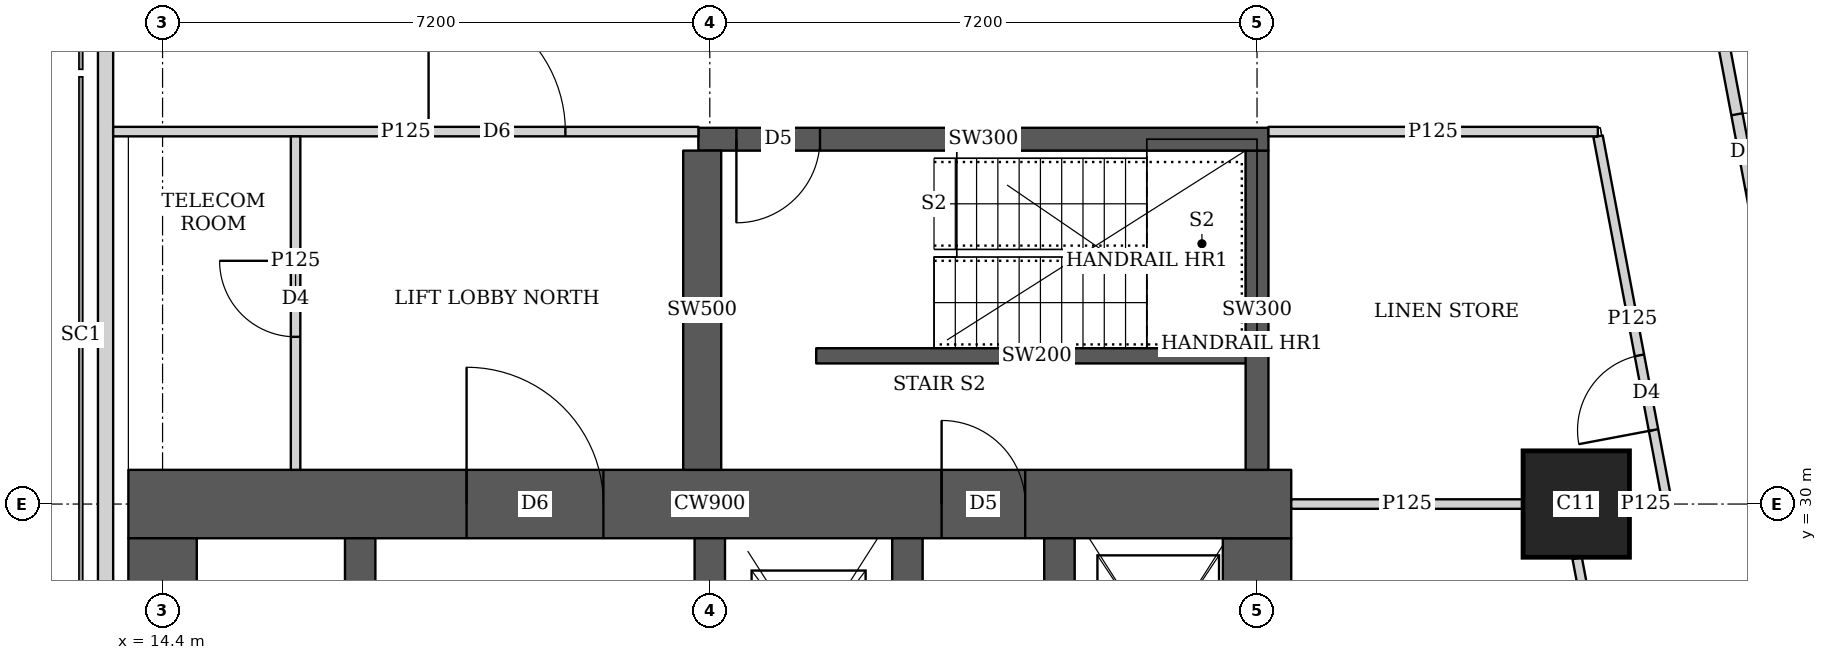
"""IFC4 building model, lengths in metres.
Left out: names, types, materials, properties, quantities, classifications, styles, units other than length and angle.
Written with IfcOpenShell. Run it as: python <this file> out.ifc"""

import sys

from ifc_helpers import new_model, si_unit, direction, frame, frame_2d, origin, origin_2d, place, context, subcontext, project, spatial, rectangle, extrude, element, fill, save


model = new_model("IFC4")
c1 = context("Model", 3, precision=1e-05, world=origin(), true_north=direction((0.0, 1.0)))
c2 = subcontext(c1, "Body", "Model", "MODEL_VIEW")
j1 = project(units=[si_unit("LENGTHUNIT", "METRE"), si_unit("PLANEANGLEUNIT", "RADIAN")], contexts=[c1])
p1 = place(None, origin())
s1 = spatial("IfcSite", under=j1, at=p1, CompositionType="ELEMENT")
p2 = place(p1, origin())
s2 = spatial("IfcBuilding", under=s1, at=p2, CompositionType="ELEMENT")
p3 = place(p2, frame((0.0, 0.0, 259.1)))
s3 = spatial("IfcBuildingStorey", under=s2, at=p3, CompositionType="ELEMENT", Elevation=259.1)
p4 = place(p3, frame((33.0, 30.0, 0.0), z_axis=(0.0, 0.0, 1.0), x_axis=(1.0, 0.0, 0.0)))
e1 = element("IfcColumn", 1, at=p4, inside=s3, PredefinedType="COLUMN", context=c2, shape_type="SweptSolid", body=[
    extrude(rectangle(XDim=1.4, YDim=1.4, at=origin_2d()), origin(), (0.0, 0.0, 1.0), 3.75),
])
p5 = place(p3, frame((13.95, 30.0, 0.0), z_axis=(0.0, 0.0, 1.0), x_axis=(1.0, 0.0, 0.0)))
e2 = element("IfcWall", 2, at=p5, inside=s3, PredefinedType="SHEAR", context=c2, shape_type="SweptSolid", body=[
    extrude(rectangle(XDim=15.3, YDim=0.9, at=frame_2d((7.65, 0.0))), origin(), (0.0, 0.0, 1.0), 3.75),
])
p6 = place(p5, frame((4.45, 0.0, 0.0)))
e3 = element("IfcOpeningElement", 3, at=p6, cuts=e2, PredefinedType="OPENING", context=c2, shape_type="SweptSolid", body=[
    extrude(rectangle(XDim=1.8, YDim=2.1, at=frame_2d((0.9, 1.05))), frame((0.0, 0.46, 0.0), z_axis=(0.0, -1.0, 0.0), x_axis=(1.0, 0.0, 0.0)), (0.0, 0.0, 1.0), 0.92),
])
p7 = place(p5, frame((10.7, 0.0, 0.0)))
e4 = element("IfcOpeningElement", 4, at=p7, cuts=e2, PredefinedType="OPENING", context=c2, shape_type="SweptSolid", body=[
    extrude(rectangle(XDim=1.1, YDim=2.1, at=frame_2d((0.55, 1.05))), frame((0.0, 0.46, 0.0), z_axis=(0.0, -1.0, 0.0), x_axis=(1.0, 0.0, 0.0)), (0.0, 0.0, 1.0), 0.92),
])
for number, where, z_axis, x_axis in (
    (5, (14.4, 15.45, 0.0), (0.0, 0.0, 1.0), (0.0, 1.0, 0.0)),
    (6, (28.8, 15.45, 0.0), (0.0, 0.0, 1.0), (0.0, 1.0, 0.0)),
):
    element("IfcWall", number, at=place(p3, frame(where, z_axis=z_axis, x_axis=x_axis)), inside=s3, PredefinedType="SHEAR", context=c2, shape_type="SweptSolid", body=[
        extrude(rectangle(XDim=14.1, YDim=0.9, at=frame_2d((7.05, 0.0))), origin(), (0.0, 0.0, 1.0), 3.75),
    ])
p8 = place(p3, frame((17.0, 15.45, 0.0), z_axis=(0.0, 0.0, 1.0), x_axis=(0.0, 1.0, 0.0)))
e7 = element("IfcWall", 7, at=p8, inside=s3, PredefinedType="SHEAR", context=c2, shape_type="SweptSolid", body=[
    extrude(rectangle(XDim=14.1, YDim=0.4, at=frame_2d((7.05, 0.0))), origin(), (0.0, 0.0, 1.0), 3.75),
])
p9 = place(p8, frame((1.05, 0.0, 0.0)))
e8 = element("IfcOpeningElement", 8, at=p9, cuts=e7, PredefinedType="OPENING", context=c2, shape_type="SweptSolid", body=[
    extrude(rectangle(XDim=1.0, YDim=2.1, at=frame_2d((0.5, 1.05))), frame((0.0, 0.21, 0.0), z_axis=(0.0, -1.0, 0.0), x_axis=(1.0, 0.0, 0.0)), (0.0, 0.0, 1.0), 0.42),
])
p10 = place(p8, frame((4.675, 0.0, 0.0)))
e9 = element("IfcOpeningElement", 9, at=p10, cuts=e7, PredefinedType="OPENING", context=c2, shape_type="SweptSolid", body=[
    extrude(rectangle(XDim=1.0, YDim=2.1, at=frame_2d((0.5, 1.05))), frame((0.0, 0.21, 0.0), z_axis=(0.0, -1.0, 0.0), x_axis=(1.0, 0.0, 0.0)), (0.0, 0.0, 1.0), 0.42),
])
p11 = place(p8, frame((8.425, 0.0, 0.0)))
e10 = element("IfcOpeningElement", 10, at=p11, cuts=e7, PredefinedType="OPENING", context=c2, shape_type="SweptSolid", body=[
    extrude(rectangle(XDim=1.0, YDim=2.1, at=frame_2d((0.5, 1.05))), frame((0.0, 0.21, 0.0), z_axis=(0.0, -1.0, 0.0), x_axis=(1.0, 0.0, 0.0)), (0.0, 0.0, 1.0), 0.42),
])
p12 = place(p8, frame((12.175, 0.0, 0.0)))
e11 = element("IfcOpeningElement", 11, at=p12, cuts=e7, PredefinedType="OPENING", context=c2, shape_type="SweptSolid", body=[
    extrude(rectangle(XDim=1.0, YDim=2.1, at=frame_2d((0.5, 1.05))), frame((0.0, 0.21, 0.0), z_axis=(0.0, -1.0, 0.0), x_axis=(1.0, 0.0, 0.0)), (0.0, 0.0, 1.0), 0.42),
])
p13 = place(p3, frame((21.6, 15.45, 0.0), z_axis=(0.0, 0.0, 1.0), x_axis=(0.0, 1.0, 0.0)))
e12 = element("IfcWall", 12, at=p13, inside=s3, PredefinedType="SHEAR", context=c2, shape_type="SweptSolid", body=[
    extrude(rectangle(XDim=14.1, YDim=0.4, at=frame_2d((7.05, 0.0))), origin(), (0.0, 0.0, 1.0), 3.75),
])
p14 = place(p13, frame((0.875, 0.0, 0.0)))
e13 = element("IfcOpeningElement", 13, at=p14, cuts=e12, PredefinedType="OPENING", context=c2, shape_type="SweptSolid", body=[
    extrude(rectangle(XDim=1.1, YDim=2.1, at=frame_2d((0.55, 1.05))), frame((0.0, 0.21, 0.0), z_axis=(0.0, -1.0, 0.0), x_axis=(1.0, 0.0, 0.0)), (0.0, 0.0, 1.0), 0.42),
])
p15 = place(p13, frame((4.625, 0.0, 0.0)))
e14 = element("IfcOpeningElement", 14, at=p15, cuts=e12, PredefinedType="OPENING", context=c2, shape_type="SweptSolid", body=[
    extrude(rectangle(XDim=1.1, YDim=2.1, at=frame_2d((0.55, 1.05))), frame((0.0, 0.21, 0.0), z_axis=(0.0, -1.0, 0.0), x_axis=(1.0, 0.0, 0.0)), (0.0, 0.0, 1.0), 0.42),
])
p16 = place(p13, frame((8.375, 0.0, 0.0)))
e15 = element("IfcOpeningElement", 15, at=p16, cuts=e12, PredefinedType="OPENING", context=c2, shape_type="SweptSolid", body=[
    extrude(rectangle(XDim=1.1, YDim=2.1, at=frame_2d((0.55, 1.05))), frame((0.0, 0.21, 0.0), z_axis=(0.0, -1.0, 0.0), x_axis=(1.0, 0.0, 0.0)), (0.0, 0.0, 1.0), 0.42),
])
p17 = place(p13, frame((12.125, 0.0, 0.0)))
e16 = element("IfcOpeningElement", 16, at=p17, cuts=e12, PredefinedType="OPENING", context=c2, shape_type="SweptSolid", body=[
    extrude(rectangle(XDim=1.1, YDim=2.1, at=frame_2d((0.55, 1.05))), frame((0.0, 0.21, 0.0), z_axis=(0.0, -1.0, 0.0), x_axis=(1.0, 0.0, 0.0)), (0.0, 0.0, 1.0), 0.42),
])
p18 = place(p3, frame((24.2, 15.45, 0.0), z_axis=(0.0, 0.0, 1.0), x_axis=(0.0, 1.0, 0.0)))
e17 = element("IfcWall", 17, at=p18, inside=s3, PredefinedType="SHEAR", context=c2, shape_type="SweptSolid", body=[
    extrude(rectangle(XDim=14.1, YDim=0.4, at=frame_2d((7.05, 0.0))), origin(), (0.0, 0.0, 1.0), 3.75),
])
p19 = place(p3, frame((26.2, 26.45, 0.0), z_axis=(0.0, 0.0, 1.0), x_axis=(0.0, 1.0, 0.0)))
e18 = element("IfcWall", 18, at=p19, inside=s3, PredefinedType="SHEAR", context=c2, shape_type="SweptSolid", body=[
    extrude(rectangle(XDim=3.1, YDim=0.4, at=frame_2d((1.55, 0.0))), origin(), (0.0, 0.0, 1.0), 3.75),
])
p20 = place(p19, frame((1.075, 0.0, 0.0)))
e19 = element("IfcOpeningElement", 19, at=p20, cuts=e18, PredefinedType="OPENING", context=c2, shape_type="SweptSolid", body=[
    extrude(rectangle(XDim=1.2, YDim=2.1, at=frame_2d((0.6, 1.05))), frame((0.0, 0.21, 0.0), z_axis=(0.0, -1.0, 0.0), x_axis=(1.0, 0.0, 0.0)), (0.0, 0.0, 1.0), 0.42),
])
p21 = place(p3, frame((21.45, 34.8, 0.0), z_axis=(0.0, 0.0, 1.0), x_axis=(1.0, 0.0, 0.0)))
e20 = element("IfcWall", 20, at=p21, inside=s3, PredefinedType="SHEAR", context=c2, shape_type="SweptSolid", body=[
    extrude(rectangle(XDim=7.5, YDim=0.3, at=frame_2d((3.75, 0.0))), origin(), (0.0, 0.0, 1.0), 3.75),
])
p22 = place(p21, frame((0.5, 0.0, 0.0)))
e21 = element("IfcOpeningElement", 21, at=p22, cuts=e20, PredefinedType="OPENING", context=c2, shape_type="SweptSolid", body=[
    extrude(rectangle(XDim=1.1, YDim=2.1, at=frame_2d((0.55, 1.05))), frame((0.0, 0.16, 0.0), z_axis=(0.0, -1.0, 0.0), x_axis=(1.0, 0.0, 0.0)), (0.0, 0.0, 1.0), 0.32),
])
p23 = place(p3, frame((21.5, 30.45, 0.0), z_axis=(0.0, 0.0, 1.0), x_axis=(0.0, 1.0, 0.0)))
e22 = element("IfcWall", 22, at=p23, inside=s3, PredefinedType="SHEAR", context=c2, shape_type="SweptSolid", body=[
    extrude(rectangle(XDim=4.2, YDim=0.5, at=frame_2d((2.1, 0.0))), origin(), (0.0, 0.0, 1.0), 3.75),
])
p24 = place(p3, frame((28.8, 30.45, 0.0), z_axis=(0.0, 0.0, 1.0), x_axis=(0.0, 1.0, 0.0)))
e23 = element("IfcWall", 23, at=p24, inside=s3, PredefinedType="SHEAR", context=c2, shape_type="SweptSolid", body=[
    extrude(rectangle(XDim=4.2, YDim=0.3, at=frame_2d((2.1, 0.0))), origin(), (0.0, 0.0, 1.0), 3.75),
])
p25 = place(p3, frame((13.65, 43.037, 0.0), z_axis=(0.0, 0.0, 1.0), x_axis=(0.0, -1.0, 0.0)))
e24 = element("IfcWall", 24, at=p25, inside=s3, PredefinedType="SOLIDWALL", context=c2, shape_type="SweptSolid", body=[
    extrude(rectangle(XDim=35.374, YDim=0.2, at=frame_2d((17.687, 0.0))), origin(), (0.0, 0.0, 1.0), 3.5),
])
p26 = place(p25, frame((1.959, 0.0, 0.9)))
e25 = element("IfcOpeningElement", 25, at=p26, cuts=e24, PredefinedType="OPENING", context=c2, shape_type="SweptSolid", body=[
    extrude(rectangle(XDim=1.8, YDim=1.5, at=frame_2d((0.9, 0.75))), frame((0.0, 0.11, 0.0), z_axis=(0.0, -1.0, 0.0), x_axis=(1.0, 0.0, 0.0)), (0.0, 0.0, 1.0), 0.22),
])
p27 = place(p3, frame((33.781, 42.186, 0.0), z_axis=(0.0, 0.0, 1.0), x_axis=(0.185593518645, -0.9826266055, 0.0)))
e26 = element("IfcWall", 26, at=p27, inside=s3, PredefinedType="SOLIDWALL", context=c2, shape_type="SweptSolid", body=[
    extrude(rectangle(XDim=35.961, YDim=0.15, at=frame_2d((17.98, 0.0))), origin(), (0.0, 0.0, 1.0), 2.5),
])
p28 = place(p27, frame((7.183, 0.0, 0.0)))
e27 = element("IfcOpeningElement", 27, at=p28, cuts=e26, PredefinedType="OPENING", context=c2, shape_type="SweptSolid", body=[
    extrude(rectangle(XDim=1.0, YDim=2.1, at=frame_2d((0.5, 1.05))), frame((0.0, 0.085, 0.0), z_axis=(0.0, -1.0, 0.0), x_axis=(1.0, 0.0, 0.0)), (0.0, 0.0, 1.0), 0.17),
])
p29 = place(p27, frame((11.76, 0.0, 0.0)))
e28 = element("IfcOpeningElement", 28, at=p29, cuts=e26, PredefinedType="OPENING", context=c2, shape_type="SweptSolid", body=[
    extrude(rectangle(XDim=1.0, YDim=2.1, at=frame_2d((0.5, 1.05))), frame((0.0, 0.085, 0.0), z_axis=(0.0, -1.0, 0.0), x_axis=(1.0, 0.0, 0.0)), (0.0, 0.0, 1.0), 0.17),
])
p30 = place(p27, frame((23.863, 0.0, 0.0)))
e29 = element("IfcOpeningElement", 29, at=p30, cuts=e26, PredefinedType="OPENING", context=c2, shape_type="SweptSolid", body=[
    extrude(rectangle(XDim=1.0, YDim=2.1, at=frame_2d((0.5, 1.05))), frame((0.0, 0.085, 0.0), z_axis=(0.0, -1.0, 0.0), x_axis=(1.0, 0.0, 0.0)), (0.0, 0.0, 1.0), 0.17),
])
p31 = place(p27, frame((30.502, 0.0, 0.0)))
e30 = element("IfcOpeningElement", 30, at=p31, cuts=e26, PredefinedType="OPENING", context=c2, shape_type="SweptSolid", body=[
    extrude(rectangle(XDim=1.0, YDim=2.1, at=frame_2d((0.5, 1.05))), frame((0.0, 0.085, 0.0), z_axis=(0.0, -1.0, 0.0), x_axis=(1.0, 0.0, 0.0)), (0.0, 0.0, 1.0), 0.17),
])
p32 = place(p3, frame((13.75, 34.9, 0.0), z_axis=(0.0, 0.0, 1.0), x_axis=(1.0, 0.0, 0.0)))
e31 = element("IfcWall", 31, at=p32, inside=s3, PredefinedType="PARTITIONING", context=c2, shape_type="SweptSolid", body=[
    extrude(rectangle(XDim=7.7, YDim=0.125, at=frame_2d((3.85, 0.0))), origin(), (0.0, 0.0, 1.0), 3.5),
])
p33 = place(p32, frame((4.15, 0.0, 0.0)))
e32 = element("IfcOpeningElement", 32, at=p33, cuts=e31, PredefinedType="OPENING", context=c2, shape_type="SweptSolid", body=[
    extrude(rectangle(XDim=1.8, YDim=2.1, at=frame_2d((0.9, 1.05))), frame((0.0, 0.073, 0.0), z_axis=(0.0, -1.0, 0.0), x_axis=(1.0, 0.0, 0.0)), (0.0, 0.0, 1.0), 0.145),
])
p34 = place(p3, frame((16.15, 30.45, 0.0), z_axis=(0.0, 0.0, 1.0), x_axis=(0.0, 1.0, 0.0)))
e33 = element("IfcWall", 33, at=p34, inside=s3, PredefinedType="PARTITIONING", context=c2, shape_type="SweptSolid", body=[
    extrude(rectangle(XDim=4.387, YDim=0.125, at=frame_2d((2.193, 0.0))), origin(), (0.0, 0.0, 1.0), 3.5),
])
p35 = place(p34, frame((1.75, 0.0, 0.0)))
e34 = element("IfcOpeningElement", 34, at=p35, cuts=e33, PredefinedType="OPENING", context=c2, shape_type="SweptSolid", body=[
    extrude(rectangle(XDim=1.0, YDim=2.1, at=frame_2d((0.5, 1.05))), frame((0.0, 0.073, 0.0), z_axis=(0.0, -1.0, 0.0), x_axis=(1.0, 0.0, 0.0)), (0.0, 0.0, 1.0), 0.145),
])
p36 = place(p3, frame((28.95, 34.9, 0.0), z_axis=(0.0, 0.0, 1.0), x_axis=(1.0, 0.0, 0.0)))
e35 = element("IfcWall", 35, at=p36, inside=s3, PredefinedType="PARTITIONING", context=c2, shape_type="SweptSolid", body=[
    extrude(rectangle(XDim=4.334, YDim=0.125, at=frame_2d((2.167, 0.0))), origin(), (0.0, 0.0, 1.0), 3.5),
])
p37 = place(p3, frame((34.193, 30.04, 0.0), z_axis=(0.0, 0.0, 1.0), x_axis=(-0.185556349615, 0.98263362507, 0.0)))
e36 = element("IfcWall", 36, at=p37, inside=s3, PredefinedType="PARTITIONING", context=c2, shape_type="SweptSolid", body=[
    extrude(rectangle(XDim=4.883, YDim=0.125, at=frame_2d((2.441, 0.0))), origin(), (0.0, 0.0, 1.0), 2.5),
])
p38 = place(p37, frame((0.95, 0.0, 0.0)))
e37 = element("IfcOpeningElement", 37, at=p38, cuts=e36, PredefinedType="OPENING", context=c2, shape_type="SweptSolid", body=[
    extrude(rectangle(XDim=1.0, YDim=2.1, at=frame_2d((0.5, 1.05))), frame((0.0, 0.073, 0.0), z_axis=(0.0, -1.0, 0.0), x_axis=(1.0, 0.0, 0.0)), (0.0, 0.0, 1.0), 0.145),
])
p39 = place(p3, frame((34.28, 22.574, 0.0), z_axis=(0.0, 0.0, 1.0), x_axis=(-0.185610991981, 0.982623305064, 0.0)))
e38 = element("IfcWall", 38, at=p39, inside=s3, PredefinedType="PARTITIONING", context=c2, shape_type="SweptSolid", body=[
    extrude(rectangle(XDim=6.832, YDim=0.125, at=frame_2d((3.416, 0.0))), origin(), (0.0, 0.0, 1.0), 2.5),
])
p40 = place(p39, frame((3.241, 0.0, 0.0)))
e39 = element("IfcOpeningElement", 39, at=p40, cuts=e38, PredefinedType="OPENING", context=c2, shape_type="SweptSolid", body=[
    extrude(rectangle(XDim=1.0, YDim=2.1, at=frame_2d((0.5, 1.05))), frame((0.0, 0.073, 0.0), z_axis=(0.0, -1.0, 0.0), x_axis=(1.0, 0.0, 0.0)), (0.0, 0.0, 1.0), 0.145),
])
p41 = place(p3, frame((29.25, 30.0, 0.0), z_axis=(0.0, 0.0, 1.0), x_axis=(1.0, 0.0, 0.0)))
e40 = element("IfcWall", 40, at=p41, inside=s3, PredefinedType="PARTITIONING", context=c2, shape_type="SweptSolid", body=[
    extrude(rectangle(XDim=3.049, YDim=0.125, at=frame_2d((1.524, 0.0))), origin(), (0.0, 0.0, 1.0), 3.5),
])
p42 = place(p3, frame((33.701, 30.0, 0.0), z_axis=(0.0, 0.0, 1.0), x_axis=(1.0, 0.0, 0.0)))
e41 = element("IfcWall", 41, at=p42, inside=s3, PredefinedType="PARTITIONING", context=c2, shape_type="SweptSolid", body=[
    extrude(rectangle(XDim=0.424, YDim=0.125, at=frame_2d((0.212, 0.0))), origin(), (0.0, 0.0, 1.0), 2.5),
])
p43 = place(p3, frame((23.0, 31.95, 0.0), z_axis=(0.0, 0.0, 1.0), x_axis=(1.0, 0.0, 0.0)))
e42 = element("IfcWall", 42, at=p43, inside=s3, PredefinedType="SHEAR", context=c2, shape_type="SweptSolid", body=[
    extrude(rectangle(XDim=5.8, YDim=0.2, at=frame_2d((2.9, 0.0))), origin(), (0.0, 0.0, 1.0), 3.75),
])
p44 = place(p28, origin())
e43 = element("IfcDoor", 43, at=p44, inside=s3, OperationType="SINGLE_SWING_RIGHT", PredefinedType="DOOR", context=c2, shape_type="SweptSolid", body=[
    extrude(rectangle(XDim=1.0, YDim=2.1, at=frame_2d((0.5, 1.05))), frame((0.0, 0.025, 0.0), z_axis=(0.0, -1.0, 0.0), x_axis=(1.0, 0.0, 0.0)), (0.0, 0.0, 1.0), 0.05),
])
fill(e27, e43)
p45 = place(p35, origin())
e44 = element("IfcDoor", 44, at=p45, inside=s3, OperationType="SINGLE_SWING_RIGHT", PredefinedType="DOOR", context=c2, shape_type="SweptSolid", body=[
    extrude(rectangle(XDim=1.0, YDim=2.1, at=frame_2d((0.5, 1.05))), frame((0.0, 0.025, 0.0), z_axis=(0.0, -1.0, 0.0), x_axis=(1.0, 0.0, 0.0)), (0.0, 0.0, 1.0), 0.05),
])
fill(e34, e44)
p46 = place(p33, origin())
e45 = element("IfcDoor", 45, at=p46, inside=s3, OperationType="DOUBLE_DOOR_SINGLE_SWING", PredefinedType="DOOR", context=c2, shape_type="SweptSolid", body=[
    extrude(rectangle(XDim=1.8, YDim=2.1, at=frame_2d((0.9, 1.05))), frame((0.0, 0.025, 0.0), z_axis=(0.0, -1.0, 0.0), x_axis=(1.0, 0.0, 0.0)), (0.0, 0.0, 1.0), 0.05),
])
fill(e32, e45)
p47 = place(p38, origin())
e46 = element("IfcDoor", 46, at=p47, inside=s3, OperationType="SINGLE_SWING_LEFT", PredefinedType="DOOR", context=c2, shape_type="SweptSolid", body=[
    extrude(rectangle(XDim=1.0, YDim=2.1, at=frame_2d((0.5, 1.05))), frame((0.0, 0.025, 0.0), z_axis=(0.0, -1.0, 0.0), x_axis=(1.0, 0.0, 0.0)), (0.0, 0.0, 1.0), 0.05),
])
fill(e37, e46)
p48 = place(p6, origin())
e47 = element("IfcDoor", 47, at=p48, inside=s3, OperationType="DOUBLE_DOOR_SINGLE_SWING", PredefinedType="DOOR", context=c2, shape_type="SweptSolid", body=[
    extrude(rectangle(XDim=1.8, YDim=2.1, at=frame_2d((0.9, 1.05))), frame((0.0, 0.025, 0.0), z_axis=(0.0, -1.0, 0.0), x_axis=(1.0, 0.0, 0.0)), (0.0, 0.0, 1.0), 0.05),
])
fill(e3, e47)
p49 = place(p7, origin())
e48 = element("IfcDoor", 48, at=p49, inside=s3, OperationType="SINGLE_SWING_LEFT", PredefinedType="DOOR", context=c2, shape_type="SweptSolid", body=[
    extrude(rectangle(XDim=1.1, YDim=2.1, at=frame_2d((0.55, 1.05))), frame((0.0, 0.025, 0.0), z_axis=(0.0, -1.0, 0.0), x_axis=(1.0, 0.0, 0.0)), (0.0, 0.0, 1.0), 0.05),
])
fill(e4, e48)
p50 = place(p22, origin())
e49 = element("IfcDoor", 49, at=p50, inside=s3, OperationType="SINGLE_SWING_RIGHT", PredefinedType="DOOR", context=c2, shape_type="SweptSolid", body=[
    extrude(rectangle(XDim=1.1, YDim=2.1, at=frame_2d((0.55, 1.05))), frame((0.0, 0.025, 0.0), z_axis=(0.0, -1.0, 0.0), x_axis=(1.0, 0.0, 0.0)), (0.0, 0.0, 1.0), 0.05),
])
fill(e21, e49)
save(model, sys.argv[1])
